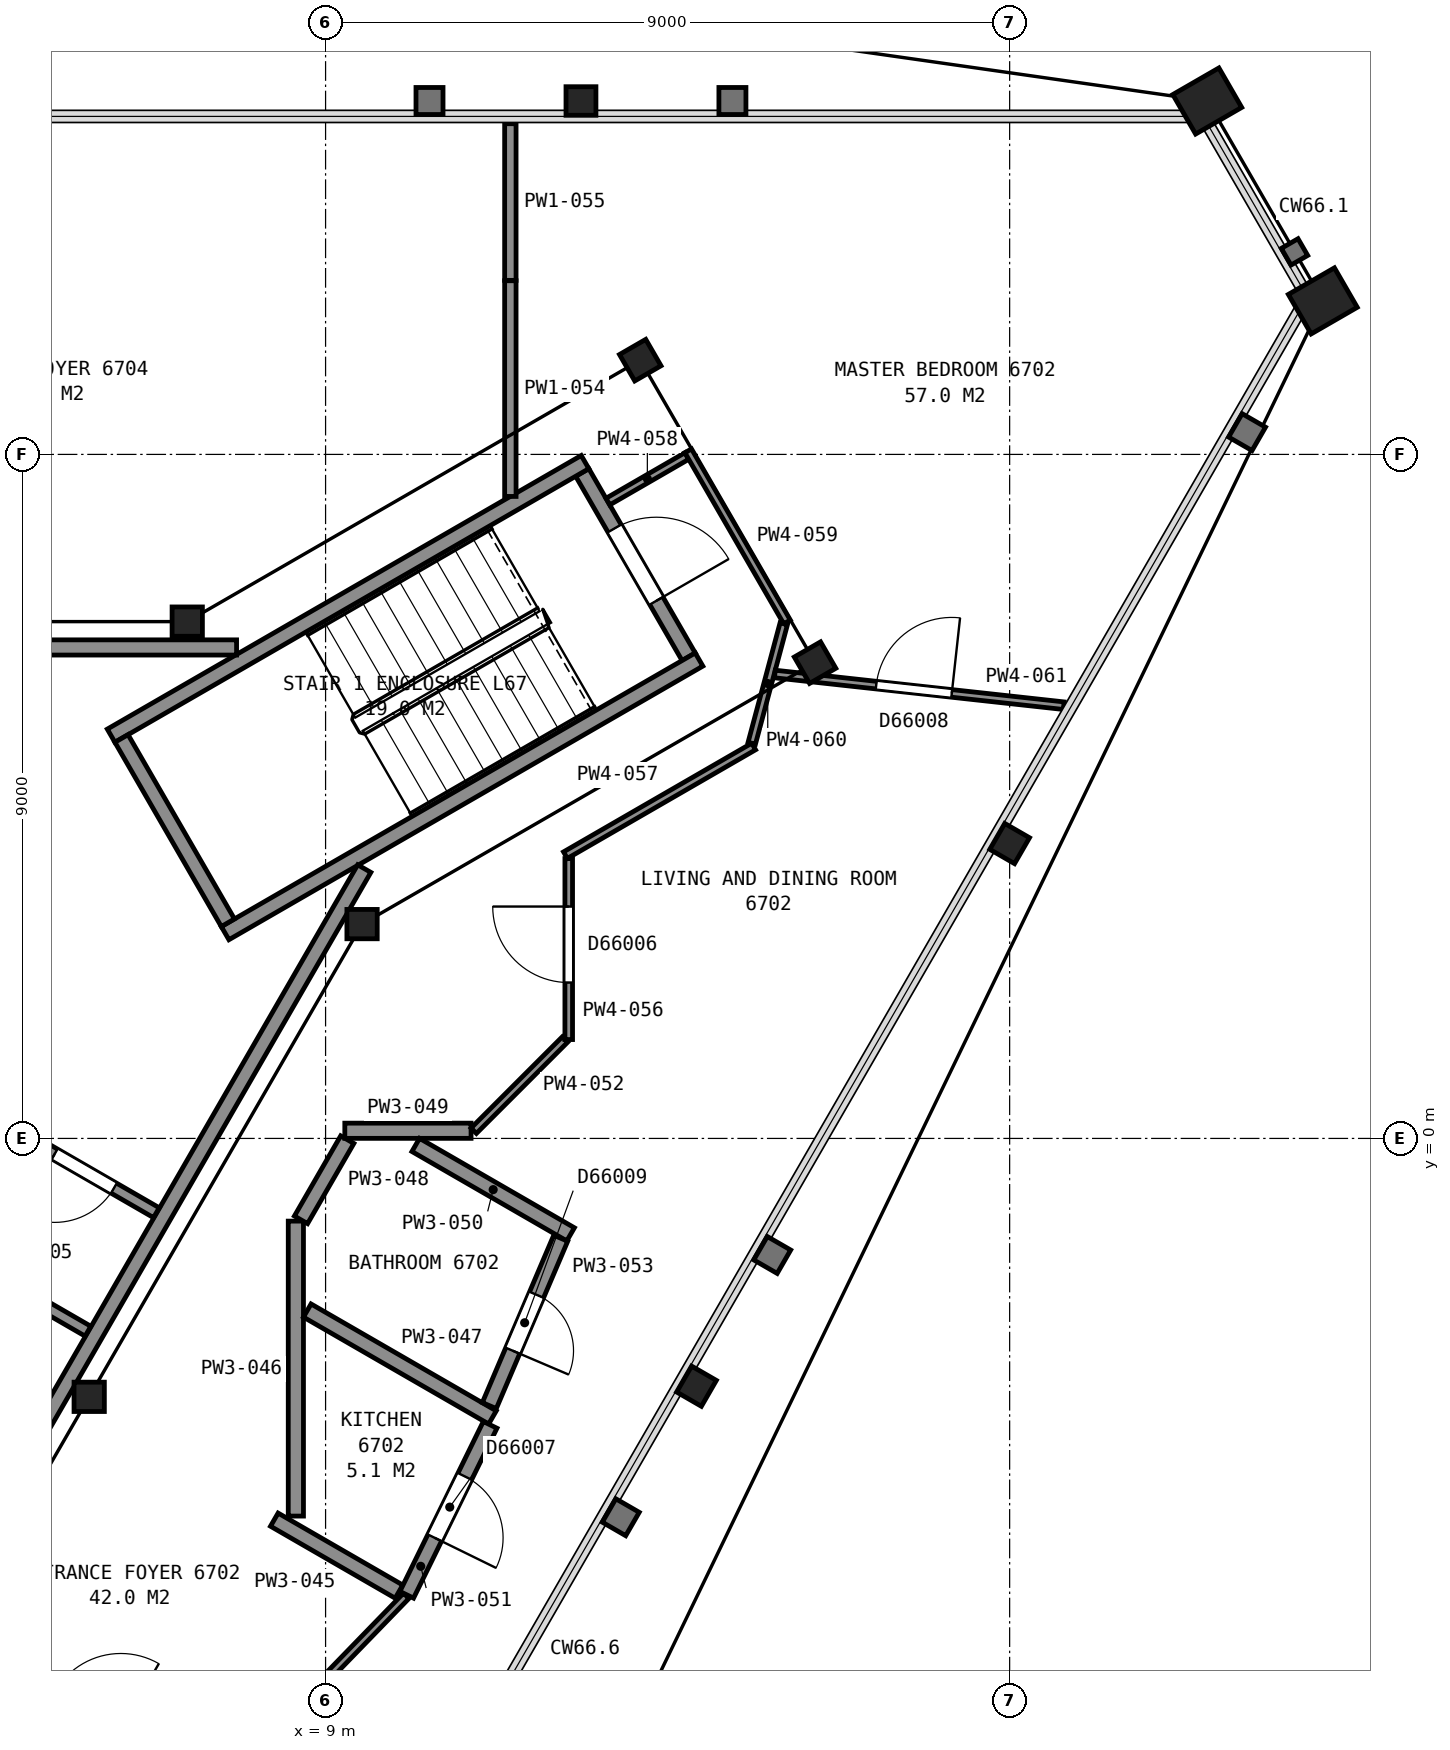
"""IFC4 building model, lengths in metres.
Left out: names, types, materials, properties, quantities, classifications, styles, units other than length and angle.
Written with IfcOpenShell. Run it as: python <this file> out.ifc"""

import sys

from ifc_helpers import new_model, si_unit, direction, frame, frame_2d, origin, origin_2d, place, context, subcontext, project, spatial, rectangle, hollow_rectangle, i_section, extrude, element, fill, save


model = new_model("IFC4")
c1 = context("Model", 3, precision=1e-05, world=origin(), true_north=direction((0.0, 1.0)))
c2 = subcontext(c1, "Body", "Model", "MODEL_VIEW")
j1 = project(units=[si_unit("LENGTHUNIT", "METRE"), si_unit("PLANEANGLEUNIT", "RADIAN")], contexts=[c1])
p1 = place(None, origin())
s1 = spatial("IfcSite", under=j1, at=p1, CompositionType="ELEMENT")
p2 = place(p1, origin())
s2 = spatial("IfcBuilding", under=s1, at=p2, CompositionType="ELEMENT")
p3 = place(p2, frame((0.0, 0.0, 267.7)))
s3 = spatial("IfcBuildingStorey", under=s2, at=p3, CompositionType="ELEMENT", Elevation=267.7)
p4 = place(p3, frame((20.6, 13.65, 0.0), z_axis=(0.0, 0.0, 1.0), x_axis=(0.5, -0.866025403784, 0.0)))
e1 = element("IfcColumn", 1, at=p4, inside=s3, PredefinedType="COLUMN", context=c2, shape_type="SweptSolid", body=[
    extrude(hollow_rectangle(XDim=0.6, YDim=0.7, WallThickness=0.04, at=origin_2d()), origin(), (0.0, 0.0, 1.0), 3.7),
])
for number, where, z_axis, x_axis in (
    (2, (12.36, 13.65, 0.0), (0.0, 0.0, 1.0), (1.0, 0.0, 0.0)),
    (3, (13.88, -3.26, 0.0), (0.0, 0.0, 1.0), (-0.5, -0.866, 0.0)),
    (4, (18.0, 3.88, 0.0), (0.0, 0.0, 1.0), (-0.5, -0.866, 0.0)),
):
    element("IfcColumn", number, at=place(p3, frame(where, z_axis=z_axis, x_axis=x_axis)), inside=s3, PredefinedType="COLUMN", context=c2, shape_type="SweptSolid", body=[
        extrude(i_section(OverallWidth=0.394, OverallDepth=0.376, WebThickness=0.017, FlangeThickness=0.028, FilletRadius=0.015, at=origin_2d()), origin(), (0.0, 0.0, 1.0), 3.7),
    ])
p5 = place(p3, frame((22.12, 11.02, 0.0), z_axis=(0.0, 0.0, 1.0), x_axis=(0.5, -0.866025403784, 0.0)))
e5 = element("IfcColumn", 5, at=p5, inside=s3, PredefinedType="COLUMN", context=c2, shape_type="SweptSolid", body=[
    extrude(hollow_rectangle(XDim=0.6, YDim=0.7, WallThickness=0.04, at=origin_2d()), origin(), (0.0, 0.0, 1.0), 3.7),
])
p6 = place(p3, frame((9.48, 2.82, 0.0), z_axis=(0.0, 0.0, 1.0), x_axis=(1.0, 0.0, 0.0)))
e6 = element("IfcColumn", 6, at=p6, inside=s3, PredefinedType="COLUMN", context=c2, shape_type="SweptSolid", body=[
    extrude(i_section(OverallWidth=0.399, OverallDepth=0.386, WebThickness=0.021, FlangeThickness=0.033, FilletRadius=0.015, at=origin_2d()), origin(), (0.0, 0.0, 1.0), 3.7),
])
for number, where, z_axis, x_axis in (
    (7, (15.44, 6.26, 0.0), (0.0, 0.0, 1.0), (0.5, -0.866, 0.0)),
    (8, (13.14, 10.24, 0.0), (0.0, 0.0, 1.0), (0.5, -0.866, 0.0)),
):
    element("IfcColumn", number, at=place(p3, frame(where, z_axis=z_axis, x_axis=x_axis)), inside=s3, PredefinedType="COLUMN", context=c2, shape_type="SweptSolid", body=[
        extrude(i_section(OverallWidth=0.401, OverallDepth=0.399, WebThickness=0.025, FlangeThickness=0.04, FilletRadius=0.015, at=origin_2d()), origin(), (0.0, 0.0, 1.0), 3.7),
    ])
for number, where, z_axis, x_axis in (
    (9, (7.18, 6.8, 0.0), (0.0, 0.0, 1.0), (1.0, 0.0, 0.0)),
    (10, (5.89, -3.4, 0.0), (0.0, 0.0, 1.0), (1.0, 0.0, 0.0)),
):
    element("IfcColumn", number, at=place(p3, frame(where, z_axis=z_axis, x_axis=x_axis)), inside=s3, PredefinedType="COLUMN", context=c2, shape_type="SweptSolid", body=[
        extrude(i_section(OverallWidth=0.399, OverallDepth=0.386, WebThickness=0.021, FlangeThickness=0.033, FilletRadius=0.015, at=origin_2d()), origin(), (0.0, 0.0, 1.0), 3.7),
    ])
p7 = place(p3, frame((13.777, 6.338, 0.0), z_axis=(0.0, 0.0, 1.0), x_axis=(-0.500049511043, 0.865996816683, 0.0)))
e11 = element("IfcWall", 11, at=p7, inside=s3, PredefinedType="PARTITIONING", context=c2, shape_type="SweptSolid", body=[
    extrude(rectangle(XDim=2.8, YDim=0.2, at=frame_2d((1.4, 0.0))), origin(), (0.0, 0.0, 1.0), 3.45),
])
p8 = place(p7, frame((0.85, 0.0, 0.0)))
e12 = element("IfcOpeningElement", 12, at=p8, cuts=e11, PredefinedType="OPENING", context=c2, shape_type="SweptSolid", body=[
    extrude(rectangle(XDim=1.1, YDim=2.1, at=frame_2d((0.55, 1.05))), frame((0.0, 0.11, 0.0), z_axis=(0.0, -1.0, 0.0), x_axis=(1.0, 0.0, 0.0)), (0.0, 0.0, 1.0), 0.22),
])
for number, where, z_axis, x_axis in (
    (13, (6.178, 5.299, 0.0), (0.0, 0.0, 1.0), (0.866, 0.5, 0.0)),
    (14, (7.678, 2.701, 0.0), (0.0, 0.0, 1.0), (0.866, 0.5, 0.0)),
):
    element("IfcWall", number, at=place(p3, frame(where, z_axis=z_axis, x_axis=x_axis)), inside=s3, PredefinedType="PARTITIONING", context=c2, shape_type="SweptSolid", body=[
        extrude(rectangle(XDim=7.2, YDim=0.2, at=frame_2d((3.6, 0.0))), origin(), (0.0, 0.0, 1.0), 3.45),
    ])
p9 = place(p3, frame((7.715, 2.838, 0.0), z_axis=(0.0, 0.0, 1.0), x_axis=(-0.500049511043, 0.865996816683, 0.0)))
e15 = element("IfcWall", 15, at=p9, inside=s3, PredefinedType="PARTITIONING", context=c2, shape_type="SweptSolid", body=[
    extrude(rectangle(XDim=2.8, YDim=0.2, at=frame_2d((1.4, 0.0))), origin(), (0.0, 0.0, 1.0), 3.45),
])
p10 = place(p3, frame((7.829, 6.46, 0.0), z_axis=(0.0, 0.0, 1.0), x_axis=(-1.0, 0.0, 0.0)))
e16 = element("IfcWall", 16, at=p10, inside=s3, PredefinedType="PARTITIONING", context=c2, shape_type="SweptSolid", body=[
    extrude(rectangle(XDim=15.658, YDim=0.2, at=frame_2d((7.829, 0.0))), origin(), (0.0, 0.0, 1.0), 3.45),
])
p11 = place(p10, frame((12.168, 0.0, 0.0)))
e17 = element("IfcOpeningElement", 17, at=p11, cuts=e16, PredefinedType="OPENING", context=c2, shape_type="SweptSolid", body=[
    extrude(rectangle(XDim=1.2, YDim=2.1, at=frame_2d((0.6, 1.05))), frame((0.0, 0.11, 0.0), z_axis=(0.0, -1.0, 0.0), x_axis=(1.0, 0.0, 0.0)), (0.0, 0.0, 1.0), 0.22),
])
p12 = place(p3, frame((3.828, -6.29, 0.0), z_axis=(0.0, 0.0, 1.0), x_axis=(0.499979739078, 0.866037101117, 0.0)))
e18 = element("IfcWall", 18, at=p12, inside=s3, PredefinedType="PARTITIONING", context=c2, shape_type="SweptSolid", body=[
    extrude(rectangle(XDim=11.363, YDim=0.2, at=frame_2d((5.681, 0.0))), origin(), (0.0, 0.0, 1.0), 3.45),
])
p13 = place(p12, frame((0.55, 0.0, 0.0)))
e19 = element("IfcOpeningElement", 19, at=p13, cuts=e18, PredefinedType="OPENING", context=c2, shape_type="SweptSolid", body=[
    extrude(rectangle(XDim=1.2, YDim=2.1, at=frame_2d((0.6, 1.05))), frame((0.0, 0.11, 0.0), z_axis=(0.0, -1.0, 0.0), x_axis=(1.0, 0.0, 0.0)), (0.0, 0.0, 1.0), 0.22),
])
p14 = place(p3, frame((3.951, -1.427, 0.0), z_axis=(0.0, 0.0, 1.0), x_axis=(0.866062920605, -0.499935013329, 0.0)))
e20 = element("IfcWall", 20, at=p14, inside=s3, PredefinedType="PARTITIONING", context=c2, shape_type="SweptSolid", body=[
    extrude(rectangle(XDim=2.22, YDim=0.15, at=frame_2d((1.11, 0.0))), origin(), (0.0, 0.0, 1.0), 3.45),
])
p15 = place(p3, frame((6.774, -0.978, 0.0), z_axis=(0.0, 0.0, 1.0), x_axis=(-0.866062920605, 0.499935013329, 0.0)))
e21 = element("IfcWall", 21, at=p15, inside=s3, PredefinedType="PARTITIONING", context=c2, shape_type="SweptSolid", body=[
    extrude(rectangle(XDim=2.22, YDim=0.15, at=frame_2d((1.11, 0.0))), origin(), (0.0, 0.0, 1.0), 3.45),
])
p16 = place(p15, frame((0.646, 0.0, 0.0)))
e22 = element("IfcOpeningElement", 22, at=p16, cuts=e21, PredefinedType="OPENING", context=c2, shape_type="SweptSolid", body=[
    extrude(rectangle(XDim=0.9, YDim=2.1, at=frame_2d((0.45, 1.05))), frame((0.0, 0.085, 0.0), z_axis=(0.0, -1.0, 0.0), x_axis=(1.0, 0.0, 0.0)), (0.0, 0.0, 1.0), 0.17),
])
p17 = place(p3, frame((9.772, -9.777, 0.0), z_axis=(0.0, 0.0, 1.0), x_axis=(-0.866083818164, 0.499898809675, 0.0)))
e23 = element("IfcWall", 23, at=p17, inside=s3, PredefinedType="PARTITIONING", context=c2, shape_type="SweptSolid", body=[
    extrude(rectangle(XDim=6.551, YDim=0.15, at=frame_2d((3.275, 0.0))), origin(), (0.0, 0.0, 1.0), 2.723),
])
p18 = place(p17, frame((4.001, 0.0, 0.0)))
e24 = element("IfcOpeningElement", 24, at=p18, cuts=e23, PredefinedType="OPENING", context=c2, shape_type="SweptSolid", body=[
    extrude(rectangle(XDim=1.0, YDim=2.1, at=frame_2d((0.5, 1.05))), frame((0.0, 0.085, 0.0), z_axis=(0.0, -1.0, 0.0), x_axis=(1.0, 0.0, 0.0)), (0.0, 0.0, 1.0), 0.17),
])
p19 = place(p3, frame((7.682, -8.47, 0.0), z_axis=(0.0, 0.0, 1.0), x_axis=(0.696344433623, 0.717707760696, 0.0)))
e25 = element("IfcWall", 25, at=p19, inside=s3, PredefinedType="PARTITIONING", context=c2, shape_type="SweptSolid", body=[
    extrude(rectangle(XDim=3.417, YDim=0.1, at=frame_2d((1.708, 0.0))), origin(), (0.0, 0.0, 1.0), 2.723),
])
p20 = place(p3, frame((8.325, -5.016, 0.0), z_axis=(0.0, 0.0, 1.0), x_axis=(0.866093293964, -0.499882392319, 0.0)))
e26 = element("IfcWall", 26, at=p20, inside=s3, PredefinedType="PARTITIONING", context=c2, shape_type="SweptSolid", body=[
    extrude(rectangle(XDim=1.894, YDim=0.2, at=frame_2d((0.947, 0.0))), origin(), (0.0, 0.0, 1.0), 2.723),
])
p21 = place(p3, frame((8.609, -4.969, 0.0), z_axis=(0.0, 0.0, 1.0), x_axis=(0.0, 1.0, 0.0)))
e27 = element("IfcWall", 27, at=p21, inside=s3, PredefinedType="PARTITIONING", context=c2, shape_type="SweptSolid", body=[
    extrude(rectangle(XDim=3.881, YDim=0.2, at=frame_2d((1.94, 0.0))), origin(), (0.0, 0.0, 1.0), 2.723),
])
p22 = place(p3, frame((8.759, -2.265, 0.0), z_axis=(0.0, 0.0, 1.0), x_axis=(0.866098885879, -0.499872703674, 0.0)))
e28 = element("IfcWall", 28, at=p22, inside=s3, PredefinedType="PARTITIONING", context=c2, shape_type="SweptSolid", body=[
    extrude(rectangle(XDim=2.813, YDim=0.2, at=frame_2d((1.407, 0.0))), origin(), (0.0, 0.0, 1.0), 2.723),
])
p23 = place(p3, frame((8.677, -1.071, 0.0), z_axis=(0.0, 0.0, 1.0), x_axis=(0.499803412959, 0.86613887362, 0.0)))
e29 = element("IfcWall", 29, at=p23, inside=s3, PredefinedType="PARTITIONING", context=c2, shape_type="SweptSolid", body=[
    extrude(rectangle(XDim=1.218, YDim=0.2, at=frame_2d((0.609, 0.0))), origin(), (0.0, 0.0, 1.0), 2.723),
])
p24 = place(p3, frame((9.253, 0.101, 0.0), z_axis=(0.0, 0.0, 1.0), x_axis=(1.0, 0.0, 0.0)))
e30 = element("IfcWall", 30, at=p24, inside=s3, PredefinedType="PARTITIONING", context=c2, shape_type="SweptSolid", body=[
    extrude(rectangle(XDim=1.661, YDim=0.2, at=frame_2d((0.831, 0.0))), origin(), (0.0, 0.0, 1.0), 2.723),
])
p25 = place(p3, frame((10.186, -0.086, 0.0), z_axis=(0.0, 0.0, 1.0), x_axis=(0.866024864377, -0.50000093428, 0.0)))
e31 = element("IfcWall", 31, at=p25, inside=s3, PredefinedType="PARTITIONING", context=c2, shape_type="SweptSolid", body=[
    extrude(rectangle(XDim=2.353, YDim=0.2, at=frame_2d((1.176, 0.0))), origin(), (0.0, 0.0, 1.0), 2.723),
])
p26 = place(p3, frame((10.068, -6.005, 0.0), z_axis=(0.0, 0.0, 1.0), x_axis=(0.440614307878, 0.897696514248, 0.0)))
e32 = element("IfcWall", 32, at=p26, inside=s3, PredefinedType="PARTITIONING", context=c2, shape_type="SweptSolid", body=[
    extrude(rectangle(XDim=2.491, YDim=0.2, at=frame_2d((1.245, 0.0))), origin(), (0.0, 0.0, 1.0), 2.723),
])
p27 = place(p26, frame((0.835, 0.0, 0.0)))
e33 = element("IfcOpeningElement", 33, at=p27, cuts=e32, PredefinedType="OPENING", context=c2, shape_type="SweptSolid", body=[
    extrude(rectangle(XDim=0.9, YDim=2.1, at=frame_2d((0.45, 1.05))), frame((0.0, 0.11, 0.0), z_axis=(0.0, -1.0, 0.0), x_axis=(1.0, 0.0, 0.0)), (0.0, 0.0, 1.0), 0.22),
])
p28 = place(p3, frame((10.949, 0.101, 0.0), z_axis=(0.0, 0.0, 1.0), x_axis=(0.707106781187, 0.707106781187, 0.0)))
e34 = element("IfcWall", 34, at=p28, inside=s3, PredefinedType="PARTITIONING", context=c2, shape_type="SweptSolid", body=[
    extrude(rectangle(XDim=1.698, YDim=0.1, at=frame_2d((0.849, 0.0))), origin(), (0.0, 0.0, 1.0), 2.723),
])
p29 = place(p3, frame((11.154, -3.515, 0.0), z_axis=(0.0, 0.0, 1.0), x_axis=(0.392515754301, 0.919745281383, 0.0)))
e35 = element("IfcWall", 35, at=p29, inside=s3, PredefinedType="PARTITIONING", context=c2, shape_type="SweptSolid", body=[
    extrude(rectangle(XDim=2.394, YDim=0.2, at=frame_2d((1.197, 0.0))), origin(), (0.0, 0.0, 1.0), 2.723),
])
p30 = place(p29, frame((0.785, 0.0, 0.0)))
e36 = element("IfcOpeningElement", 36, at=p30, cuts=e35, PredefinedType="OPENING", context=c2, shape_type="SweptSolid", body=[
    extrude(rectangle(XDim=0.8, YDim=2.1, at=frame_2d((0.4, 1.05))), frame((0.0, 0.11, 0.0), z_axis=(0.0, -1.0, 0.0), x_axis=(1.0, 0.0, 0.0)), (0.0, 0.0, 1.0), 0.22),
])
p31 = place(p3, frame((11.431, 8.447, 0.0), z_axis=(0.0, 0.0, 1.0), x_axis=(0.0, 1.0, 0.0)))
e37 = element("IfcWall", 37, at=p31, inside=s3, PredefinedType="PARTITIONING", context=c2, shape_type="SweptSolid", body=[
    extrude(rectangle(XDim=2.838, YDim=0.15, at=frame_2d((1.419, 0.0))), origin(), (0.0, 0.0, 1.0), 2.723),
])
p32 = place(p3, frame((11.431, 11.29, 0.0), z_axis=(0.0, 0.0, 1.0), x_axis=(0.0, 1.0, 0.0)))
e38 = element("IfcWall", 38, at=p32, inside=s3, PredefinedType="PARTITIONING", context=c2, shape_type="SweptSolid", body=[
    extrude(rectangle(XDim=2.061, YDim=0.15, at=frame_2d((1.031, 0.0))), origin(), (0.0, 0.0, 1.0), 2.723),
])
p33 = place(p3, frame((12.199, 3.682, 0.0), z_axis=(0.0, 0.0, 1.0), x_axis=(0.0, -1.0, 0.0)))
e39 = element("IfcWall", 39, at=p33, inside=s3, PredefinedType="PARTITIONING", context=c2, shape_type="SweptSolid", body=[
    extrude(rectangle(XDim=2.381, YDim=0.1, at=frame_2d((1.19, 0.0))), origin(), (0.0, 0.0, 1.0), 2.723),
])
p34 = place(p33, frame((0.631, 0.0, 0.0)))
e40 = element("IfcOpeningElement", 40, at=p34, cuts=e39, PredefinedType="OPENING", context=c2, shape_type="SweptSolid", body=[
    extrude(rectangle(XDim=1.0, YDim=2.1, at=frame_2d((0.5, 1.05))), frame((0.0, 0.06, 0.0), z_axis=(0.0, -1.0, 0.0), x_axis=(1.0, 0.0, 0.0)), (0.0, 0.0, 1.0), 0.12),
])
p35 = place(p3, frame((12.156, 3.727, 0.0), z_axis=(0.0, 0.0, 1.0), x_axis=(0.866012137121, 0.500022977831, 0.0)))
e41 = element("IfcWall", 41, at=p35, inside=s3, PredefinedType="PARTITIONING", context=c2, shape_type="SweptSolid", body=[
    extrude(rectangle(XDim=2.86, YDim=0.1, at=frame_2d((1.43, 0.0))), origin(), (0.0, 0.0, 1.0), 2.723),
])
p36 = place(p3, frame((12.714, 8.379, 0.0), z_axis=(0.0, 0.0, 1.0), x_axis=(0.86585331735, 0.500297944063, 0.0)))
e42 = element("IfcWall", 42, at=p36, inside=s3, PredefinedType="PARTITIONING", context=c2, shape_type="SweptSolid", body=[
    extrude(rectangle(XDim=1.199, YDim=0.1, at=frame_2d((0.6, 0.0))), origin(), (0.0, 0.0, 1.0), 2.723),
])
p37 = place(p3, frame((13.771, 9.047, 0.0), z_axis=(0.0, 0.0, 1.0), x_axis=(0.500006934395, -0.866021400173, 0.0)))
e43 = element("IfcWall", 43, at=p37, inside=s3, PredefinedType="PARTITIONING", context=c2, shape_type="SweptSolid", body=[
    extrude(rectangle(XDim=2.6, YDim=0.1, at=frame_2d((1.3, 0.0))), origin(), (0.0, 0.0, 1.0), 2.723),
])
p38 = place(p3, frame((14.607, 5.2, 0.0), z_axis=(0.0, 0.0, 1.0), x_axis=(0.258531076101, 0.966002941346, 0.0)))
e44 = element("IfcWall", 44, at=p38, inside=s3, PredefinedType="PARTITIONING", context=c2, shape_type="SweptSolid", body=[
    extrude(rectangle(XDim=1.627, YDim=0.1, at=frame_2d((0.813, 0.0))), origin(), (0.0, 0.0, 1.0), 2.723),
])
p39 = place(p3, frame((14.911, 6.111, 0.0), z_axis=(0.0, 0.0, 1.0), x_axis=(0.994040808037, -0.10900858662, 0.0)))
e45 = element("IfcWall", 45, at=p39, inside=s3, PredefinedType="PARTITIONING", context=c2, shape_type="SweptSolid", body=[
    extrude(rectangle(XDim=3.823, YDim=0.1, at=frame_2d((1.912, 0.0))), origin(), (0.0, 0.0, 1.0), 2.723),
])
p40 = place(p39, frame((1.342, 0.0, 0.0)))
e46 = element("IfcOpeningElement", 46, at=p40, cuts=e45, PredefinedType="OPENING", context=c2, shape_type="SweptSolid", body=[
    extrude(rectangle(XDim=1.0, YDim=2.1, at=frame_2d((0.5, 1.05))), frame((0.0, 0.06, 0.0), z_axis=(0.0, -1.0, 0.0), x_axis=(1.0, 0.0, 0.0)), (0.0, 0.0, 1.0), 0.12),
])
p41 = place(p8, origin())
e47 = element("IfcDoor", 47, at=p41, inside=s3, OperationType="SINGLE_SWING_LEFT", PredefinedType="DOOR", context=c2, shape_type="SweptSolid", body=[
    extrude(rectangle(XDim=1.1, YDim=2.1, at=frame_2d((0.55, 1.05))), frame((0.0, 0.025, 0.0), z_axis=(0.0, -1.0, 0.0), x_axis=(1.0, 0.0, 0.0)), (0.0, 0.0, 1.0), 0.05),
])
fill(e12, e47)
p42 = place(p16, origin())
e48 = element("IfcDoor", 48, at=p42, inside=s3, OperationType="SINGLE_SWING_RIGHT", PredefinedType="DOOR", context=c2, shape_type="SweptSolid", body=[
    extrude(rectangle(XDim=0.9, YDim=2.1, at=frame_2d((0.45, 1.05))), frame((0.0, 0.025, 0.0), z_axis=(0.0, -1.0, 0.0), x_axis=(1.0, 0.0, 0.0)), (0.0, 0.0, 1.0), 0.05),
])
fill(e22, e48)
p43 = place(p27, origin())
e49 = element("IfcDoor", 49, at=p43, inside=s3, OperationType="SINGLE_SWING_LEFT", PredefinedType="DOOR", context=c2, shape_type="SweptSolid", body=[
    extrude(rectangle(XDim=0.9, YDim=2.1, at=frame_2d((0.45, 1.05))), frame((0.0, 0.025, 0.0), z_axis=(0.0, -1.0, 0.0), x_axis=(1.0, 0.0, 0.0)), (0.0, 0.0, 1.0), 0.05),
])
fill(e33, e49)
p44 = place(p30, origin())
e50 = element("IfcDoor", 50, at=p44, inside=s3, OperationType="SINGLE_SWING_LEFT", PredefinedType="DOOR", context=c2, shape_type="SweptSolid", body=[
    extrude(rectangle(XDim=0.8, YDim=2.1, at=frame_2d((0.4, 1.05))), frame((0.0, 0.025, 0.0), z_axis=(0.0, -1.0, 0.0), x_axis=(1.0, 0.0, 0.0)), (0.0, 0.0, 1.0), 0.05),
])
fill(e36, e50)
p45 = place(p34, origin())
e51 = element("IfcDoor", 51, at=p45, inside=s3, OperationType="SINGLE_SWING_LEFT", PredefinedType="DOOR", context=c2, shape_type="SweptSolid", body=[
    extrude(rectangle(XDim=1.0, YDim=2.1, at=frame_2d((0.5, 1.05))), frame((0.0, 0.025, 0.0), z_axis=(0.0, -1.0, 0.0), x_axis=(1.0, 0.0, 0.0)), (0.0, 0.0, 1.0), 0.05),
])
fill(e40, e51)
p46 = place(p40, origin())
e52 = element("IfcDoor", 52, at=p46, inside=s3, OperationType="SINGLE_SWING_RIGHT", PredefinedType="DOOR", context=c2, shape_type="SweptSolid", body=[
    extrude(rectangle(XDim=1.0, YDim=2.1, at=frame_2d((0.5, 1.05))), frame((0.0, 0.025, 0.0), z_axis=(0.0, -1.0, 0.0), x_axis=(1.0, 0.0, 0.0)), (0.0, 0.0, 1.0), 0.05),
])
fill(e46, e52)
save(model, sys.argv[1])
